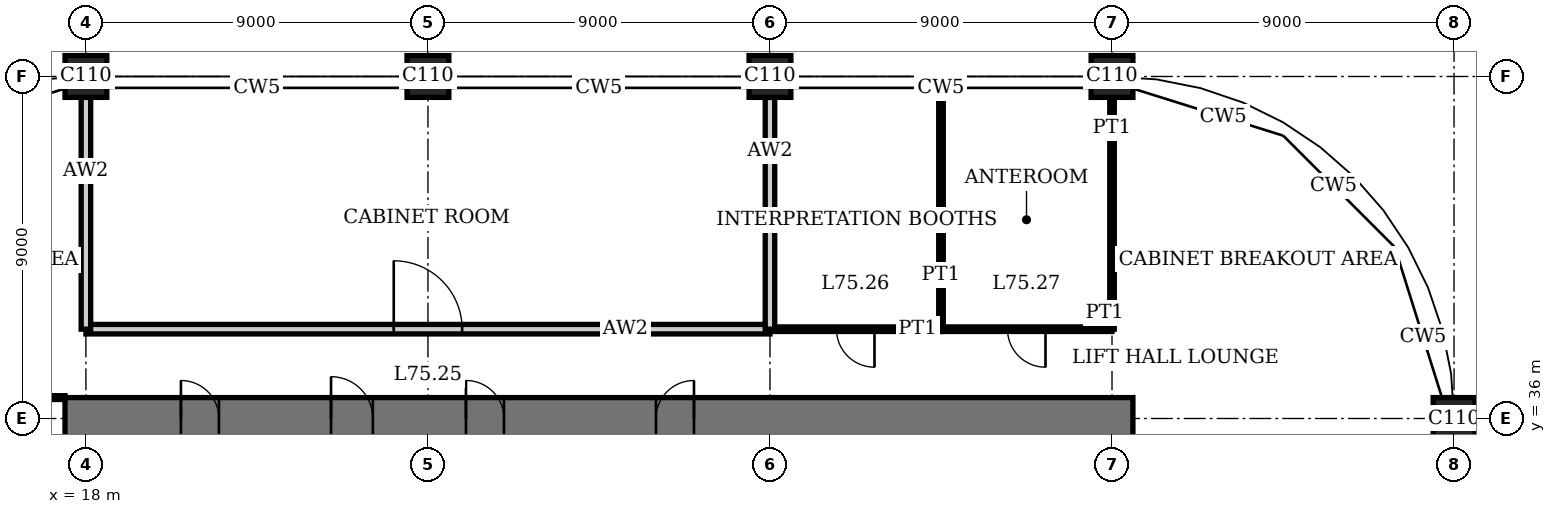
"""IFC4 building model, lengths in metres.
Left out: names, types, materials, properties, quantities, classifications, styles, units other than length and angle.
Written with IfcOpenShell. Run it as: python <this file> out.ifc"""

import sys

from ifc_helpers import new_model, si_unit, direction, frame, frame_2d, origin, origin_2d, place, context, subcontext, project, spatial, rectangle, extrude, element, fill, save


model = new_model("IFC4")
c1 = context("Model", 3, precision=1e-05, world=origin(), true_north=direction((0.0, 1.0)))
c2 = subcontext(c1, "Body", "Model", "MODEL_VIEW")
j1 = project(units=[si_unit("LENGTHUNIT", "METRE"), si_unit("PLANEANGLEUNIT", "RADIAN")], contexts=[c1])
p1 = place(None, origin())
s1 = spatial("IfcSite", under=j1, at=p1, CompositionType="ELEMENT")
p2 = place(p1, origin())
s2 = spatial("IfcBuilding", under=s1, at=p2, CompositionType="ELEMENT")
p3 = place(p2, frame((0.0, 0.0, 307.4)))
s3 = spatial("IfcBuildingStorey", under=s2, at=p3, CompositionType="ELEMENT", Elevation=307.4)
for number, where, z_axis, x_axis in (
    (1, (18.0, 45.0, 0.0), (0.0, 0.0, 1.0), (1.0, 0.0, 0.0)),
    (2, (27.0, 45.0, 0.0), (0.0, 0.0, 1.0), (1.0, 0.0, 0.0)),
    (3, (36.0, 45.0, 0.0), (0.0, 0.0, 1.0), (1.0, 0.0, 0.0)),
    (4, (45.0, 45.0, 0.0), (0.0, 0.0, 1.0), (1.0, 0.0, 0.0)),
    (5, (54.0, 36.0, 0.0), (0.0, 0.0, 1.0), (1.0, 0.0, 0.0)),
):
    element("IfcColumn", number, at=place(p3, frame(where, z_axis=z_axis, x_axis=x_axis)), inside=s3, PredefinedType="COLUMN", context=c2, shape_type="SweptSolid", body=[
        extrude(rectangle(XDim=1.1, YDim=1.1, at=origin_2d()), origin(), (0.0, 0.0, 1.0), 4.4),
    ])
p4 = place(p3, frame((45.55, 36.0, 0.0), z_axis=(0.0, 0.0, 1.0), x_axis=(-1.0, 0.0, 0.0)))
e6 = element("IfcWall", 6, at=p4, inside=s3, PredefinedType="SHEAR", context=c2, shape_type="SweptSolid", body=[
    extrude(rectangle(XDim=28.1, YDim=1.1, at=frame_2d((14.05, 0.0))), origin(), (0.0, 0.0, 1.0), 4.4),
])
p5 = place(p4, frame((11.55, 0.0, 0.0)))
e7 = element("IfcOpeningElement", 7, at=p5, cuts=e6, PredefinedType="OPENING", context=c2, shape_type="SweptSolid", body=[
    extrude(rectangle(XDim=1.0, YDim=2.4, at=frame_2d((0.5, 1.2))), frame((0.0, 0.56, 0.0), z_axis=(0.0, -1.0, 0.0), x_axis=(1.0, 0.0, 0.0)), (0.0, 0.0, 1.0), 1.12),
])
p6 = place(p4, frame((16.55, 0.0, 0.0)))
e8 = element("IfcOpeningElement", 8, at=p6, cuts=e6, PredefinedType="OPENING", context=c2, shape_type="SweptSolid", body=[
    extrude(rectangle(XDim=1.0, YDim=2.4, at=frame_2d((0.5, 1.2))), frame((0.0, 0.56, 0.0), z_axis=(0.0, -1.0, 0.0), x_axis=(1.0, 0.0, 0.0)), (0.0, 0.0, 1.0), 1.12),
])
p7 = place(p4, frame((20.0, 0.0, 0.0)))
e9 = element("IfcOpeningElement", 9, at=p7, cuts=e6, PredefinedType="OPENING", context=c2, shape_type="SweptSolid", body=[
    extrude(rectangle(XDim=1.1, YDim=2.4, at=frame_2d((0.55, 1.2))), frame((0.0, 0.56, 0.0), z_axis=(0.0, -1.0, 0.0), x_axis=(1.0, 0.0, 0.0)), (0.0, 0.0, 1.0), 1.12),
])
p8 = place(p4, frame((24.05, 0.0, 0.0)))
e10 = element("IfcOpeningElement", 10, at=p8, cuts=e6, PredefinedType="OPENING", context=c2, shape_type="SweptSolid", body=[
    extrude(rectangle(XDim=1.0, YDim=2.4, at=frame_2d((0.5, 1.2))), frame((0.0, 0.56, 0.0), z_axis=(0.0, -1.0, 0.0), x_axis=(1.0, 0.0, 0.0)), (0.0, 0.0, 1.0), 1.12),
])
p9 = place(p3, frame((9.55, 36.55, 0.0), z_axis=(0.0, 0.0, 1.0), x_axis=(1.0, 0.0, 0.0)))
e11 = element("IfcWall", 11, at=p9, inside=s3, PredefinedType="PARTITIONING", context=c2, shape_type="SweptSolid", body=[
    extrude(rectangle(XDim=7.9, YDim=0.1, at=frame_2d((3.95, 0.0))), origin(), (0.0, 0.0, 1.0), 4.05),
])
p10 = place(p3, frame((18.0, 38.35, 0.0), z_axis=(0.0, 0.0, 1.0), x_axis=(1.0, 0.0, 0.0)))
e12 = element("IfcWall", 12, at=p10, inside=s3, PredefinedType="PARTITIONING", context=c2, shape_type="SweptSolid", body=[
    extrude(rectangle(XDim=18.0, YDim=0.25, at=frame_2d((9.0, 0.0))), origin(), (0.0, 0.0, 1.0), 4.05),
])
p11 = place(p10, frame((8.1, 0.0, 0.0)))
e13 = element("IfcOpeningElement", 13, at=p11, cuts=e12, PredefinedType="OPENING", context=c2, shape_type="SweptSolid", body=[
    extrude(rectangle(XDim=1.8, YDim=2.4, at=frame_2d((0.9, 1.2))), frame((0.0, 0.135, 0.0), z_axis=(0.0, -1.0, 0.0), x_axis=(1.0, 0.0, 0.0)), (0.0, 0.0, 1.0), 0.27),
])
p12 = place(p3, frame((36.0, 38.35, 0.0), z_axis=(0.0, 0.0, 1.0), x_axis=(1.0, 0.0, 0.0)))
e14 = element("IfcWall", 14, at=p12, inside=s3, PredefinedType="PARTITIONING", context=c2, shape_type="SweptSolid", body=[
    extrude(rectangle(XDim=4.5, YDim=0.12, at=frame_2d((2.25, 0.0))), origin(), (0.0, 0.0, 1.0), 4.05),
])
p13 = place(p12, frame((1.75, 0.0, 0.0)))
e15 = element("IfcOpeningElement", 15, at=p13, cuts=e14, PredefinedType="OPENING", context=c2, shape_type="SweptSolid", body=[
    extrude(rectangle(XDim=1.0, YDim=2.4, at=frame_2d((0.5, 1.2))), frame((0.0, 0.07, 0.0), z_axis=(0.0, -1.0, 0.0), x_axis=(1.0, 0.0, 0.0)), (0.0, 0.0, 1.0), 0.14),
])
p14 = place(p3, frame((40.5, 38.35, 0.0), z_axis=(0.0, 0.0, 1.0), x_axis=(1.0, 0.0, 0.0)))
e16 = element("IfcWall", 16, at=p14, inside=s3, PredefinedType="PARTITIONING", context=c2, shape_type="SweptSolid", body=[
    extrude(rectangle(XDim=4.5, YDim=0.12, at=frame_2d((2.25, 0.0))), origin(), (0.0, 0.0, 1.0), 4.05),
])
p15 = place(p14, frame((1.75, 0.0, 0.0)))
e17 = element("IfcOpeningElement", 17, at=p15, cuts=e16, PredefinedType="OPENING", context=c2, shape_type="SweptSolid", body=[
    extrude(rectangle(XDim=1.0, YDim=2.4, at=frame_2d((0.5, 1.2))), frame((0.0, 0.07, 0.0), z_axis=(0.0, -1.0, 0.0), x_axis=(1.0, 0.0, 0.0)), (0.0, 0.0, 1.0), 0.14),
])
for number, where, z_axis, x_axis in (
    (18, (18.0, 38.35, 0.0), (0.0, 0.0, 1.0), (0.0, 1.0, 0.0)),
    (19, (36.0, 38.35, 0.0), (0.0, 0.0, 1.0), (0.0, 1.0, 0.0)),
):
    element("IfcWall", number, at=place(p3, frame(where, z_axis=z_axis, x_axis=x_axis)), inside=s3, PredefinedType="PARTITIONING", context=c2, shape_type="SweptSolid", body=[
        extrude(rectangle(XDim=6.1, YDim=0.25, at=frame_2d((3.05, 0.0))), origin(), (0.0, 0.0, 1.0), 3.25),
    ])
p16 = place(p3, frame((40.5, 38.35, 0.0), z_axis=(0.0, 0.0, 1.0), x_axis=(0.0, 1.0, 0.0)))
e20 = element("IfcWall", 20, at=p16, inside=s3, PredefinedType="PARTITIONING", context=c2, shape_type="SweptSolid", body=[
    extrude(rectangle(XDim=6.34, YDim=0.12, at=frame_2d((3.17, 0.0))), origin(), (0.0, 0.0, 1.0), 4.05),
])
p17 = place(p3, frame((45.0, 38.35, 0.0), z_axis=(0.0, 0.0, 1.0), x_axis=(0.0, 1.0, 0.0)))
e21 = element("IfcWall", 21, at=p17, inside=s3, PredefinedType="PARTITIONING", context=c2, shape_type="SweptSolid", body=[
    extrude(rectangle(XDim=6.1, YDim=0.12, at=frame_2d((3.05, 0.0))), origin(), (0.0, 0.0, 1.0), 3.25),
])
p18 = place(p5, origin())
e22 = element("IfcDoor", 22, at=p18, inside=s3, OperationType="SINGLE_SWING_LEFT", PredefinedType="DOOR", context=c2, shape_type="SweptSolid", body=[
    extrude(rectangle(XDim=1.0, YDim=2.4, at=frame_2d((0.5, 1.2))), frame((0.0, 0.025, 0.0), z_axis=(0.0, -1.0, 0.0), x_axis=(1.0, 0.0, 0.0)), (0.0, 0.0, 1.0), 0.05),
    extrude(rectangle(XDim=0.04, YDim=2.4, at=frame_2d((0.02, 1.2))), frame((0.0, 0.4, 0.0), z_axis=(0.0, -1.0, 0.0), x_axis=(1.0, 0.0, 0.0)), (0.0, 0.0, 1.0), 0.8),
    extrude(rectangle(XDim=0.04, YDim=2.4, at=frame_2d((0.98, 1.2))), frame((0.0, 0.4, 0.0), z_axis=(0.0, -1.0, 0.0), x_axis=(1.0, 0.0, 0.0)), (0.0, 0.0, 1.0), 0.8),
    extrude(rectangle(XDim=1.0, YDim=0.04, at=frame_2d((0.5, 2.38))), frame((0.0, 0.4, 0.0), z_axis=(0.0, -1.0, 0.0), x_axis=(1.0, 0.0, 0.0)), (0.0, 0.0, 1.0), 0.8),
])
fill(e7, e22)
p19 = place(p6, origin())
e23 = element("IfcDoor", 23, at=p19, inside=s3, OperationType="SINGLE_SWING_RIGHT", PredefinedType="DOOR", context=c2, shape_type="SweptSolid", body=[
    extrude(rectangle(XDim=1.0, YDim=2.4, at=frame_2d((0.5, 1.2))), frame((0.0, 0.025, 0.0), z_axis=(0.0, -1.0, 0.0), x_axis=(1.0, 0.0, 0.0)), (0.0, 0.0, 1.0), 0.05),
    extrude(rectangle(XDim=0.04, YDim=2.4, at=frame_2d((0.02, 1.2))), frame((0.0, 0.4, 0.0), z_axis=(0.0, -1.0, 0.0), x_axis=(1.0, 0.0, 0.0)), (0.0, 0.0, 1.0), 0.8),
    extrude(rectangle(XDim=0.04, YDim=2.4, at=frame_2d((0.98, 1.2))), frame((0.0, 0.4, 0.0), z_axis=(0.0, -1.0, 0.0), x_axis=(1.0, 0.0, 0.0)), (0.0, 0.0, 1.0), 0.8),
    extrude(rectangle(XDim=1.0, YDim=0.04, at=frame_2d((0.5, 2.38))), frame((0.0, 0.4, 0.0), z_axis=(0.0, -1.0, 0.0), x_axis=(1.0, 0.0, 0.0)), (0.0, 0.0, 1.0), 0.8),
])
fill(e8, e23)
p20 = place(p7, origin())
e24 = element("IfcDoor", 24, at=p20, inside=s3, OperationType="SINGLE_SWING_RIGHT", PredefinedType="DOOR", context=c2, shape_type="SweptSolid", body=[
    extrude(rectangle(XDim=1.1, YDim=2.4, at=frame_2d((0.55, 1.2))), frame((0.0, 0.025, 0.0), z_axis=(0.0, -1.0, 0.0), x_axis=(1.0, 0.0, 0.0)), (0.0, 0.0, 1.0), 0.05),
    extrude(rectangle(XDim=0.04, YDim=2.4, at=frame_2d((0.02, 1.2))), frame((0.0, 0.44, 0.0), z_axis=(0.0, -1.0, 0.0), x_axis=(1.0, 0.0, 0.0)), (0.0, 0.0, 1.0), 0.88),
    extrude(rectangle(XDim=0.04, YDim=2.4, at=frame_2d((1.08, 1.2))), frame((0.0, 0.44, 0.0), z_axis=(0.0, -1.0, 0.0), x_axis=(1.0, 0.0, 0.0)), (0.0, 0.0, 1.0), 0.88),
    extrude(rectangle(XDim=1.1, YDim=0.04, at=frame_2d((0.55, 2.38))), frame((0.0, 0.44, 0.0), z_axis=(0.0, -1.0, 0.0), x_axis=(1.0, 0.0, 0.0)), (0.0, 0.0, 1.0), 0.88),
])
fill(e9, e24)
p21 = place(p8, origin())
e25 = element("IfcDoor", 25, at=p21, inside=s3, OperationType="SINGLE_SWING_RIGHT", PredefinedType="DOOR", context=c2, shape_type="SweptSolid", body=[
    extrude(rectangle(XDim=1.0, YDim=2.4, at=frame_2d((0.5, 1.2))), frame((0.0, 0.025, 0.0), z_axis=(0.0, -1.0, 0.0), x_axis=(1.0, 0.0, 0.0)), (0.0, 0.0, 1.0), 0.05),
    extrude(rectangle(XDim=0.04, YDim=2.4, at=frame_2d((0.02, 1.2))), frame((0.0, 0.4, 0.0), z_axis=(0.0, -1.0, 0.0), x_axis=(1.0, 0.0, 0.0)), (0.0, 0.0, 1.0), 0.8),
    extrude(rectangle(XDim=0.04, YDim=2.4, at=frame_2d((0.98, 1.2))), frame((0.0, 0.4, 0.0), z_axis=(0.0, -1.0, 0.0), x_axis=(1.0, 0.0, 0.0)), (0.0, 0.0, 1.0), 0.8),
    extrude(rectangle(XDim=1.0, YDim=0.04, at=frame_2d((0.5, 2.38))), frame((0.0, 0.4, 0.0), z_axis=(0.0, -1.0, 0.0), x_axis=(1.0, 0.0, 0.0)), (0.0, 0.0, 1.0), 0.8),
])
fill(e10, e25)
p22 = place(p11, origin())
e26 = element("IfcDoor", 26, at=p22, inside=s3, OperationType="DOUBLE_DOOR_SINGLE_SWING", PredefinedType="DOOR", context=c2, shape_type="SweptSolid", body=[
    extrude(rectangle(XDim=1.8, YDim=2.4, at=frame_2d((0.9, 1.2))), frame((0.0, 0.025, 0.0), z_axis=(0.0, -1.0, 0.0), x_axis=(1.0, 0.0, 0.0)), (0.0, 0.0, 1.0), 0.05),
])
fill(e13, e26)
p23 = place(p13, origin())
e27 = element("IfcDoor", 27, at=p23, inside=s3, OperationType="SINGLE_SWING_RIGHT", PredefinedType="DOOR", context=c2, shape_type="SweptSolid", body=[
    extrude(rectangle(XDim=1.0, YDim=2.4, at=frame_2d((0.5, 1.2))), frame((0.0, 0.025, 0.0), z_axis=(0.0, -1.0, 0.0), x_axis=(1.0, 0.0, 0.0)), (0.0, 0.0, 1.0), 0.05),
])
fill(e15, e27)
p24 = place(p15, origin())
e28 = element("IfcDoor", 28, at=p24, inside=s3, OperationType="SINGLE_SWING_RIGHT", PredefinedType="DOOR", context=c2, shape_type="SweptSolid", body=[
    extrude(rectangle(XDim=1.0, YDim=2.4, at=frame_2d((0.5, 1.2))), frame((0.0, 0.025, 0.0), z_axis=(0.0, -1.0, 0.0), x_axis=(1.0, 0.0, 0.0)), (0.0, 0.0, 1.0), 0.05),
])
fill(e17, e28)
save(model, sys.argv[1])
